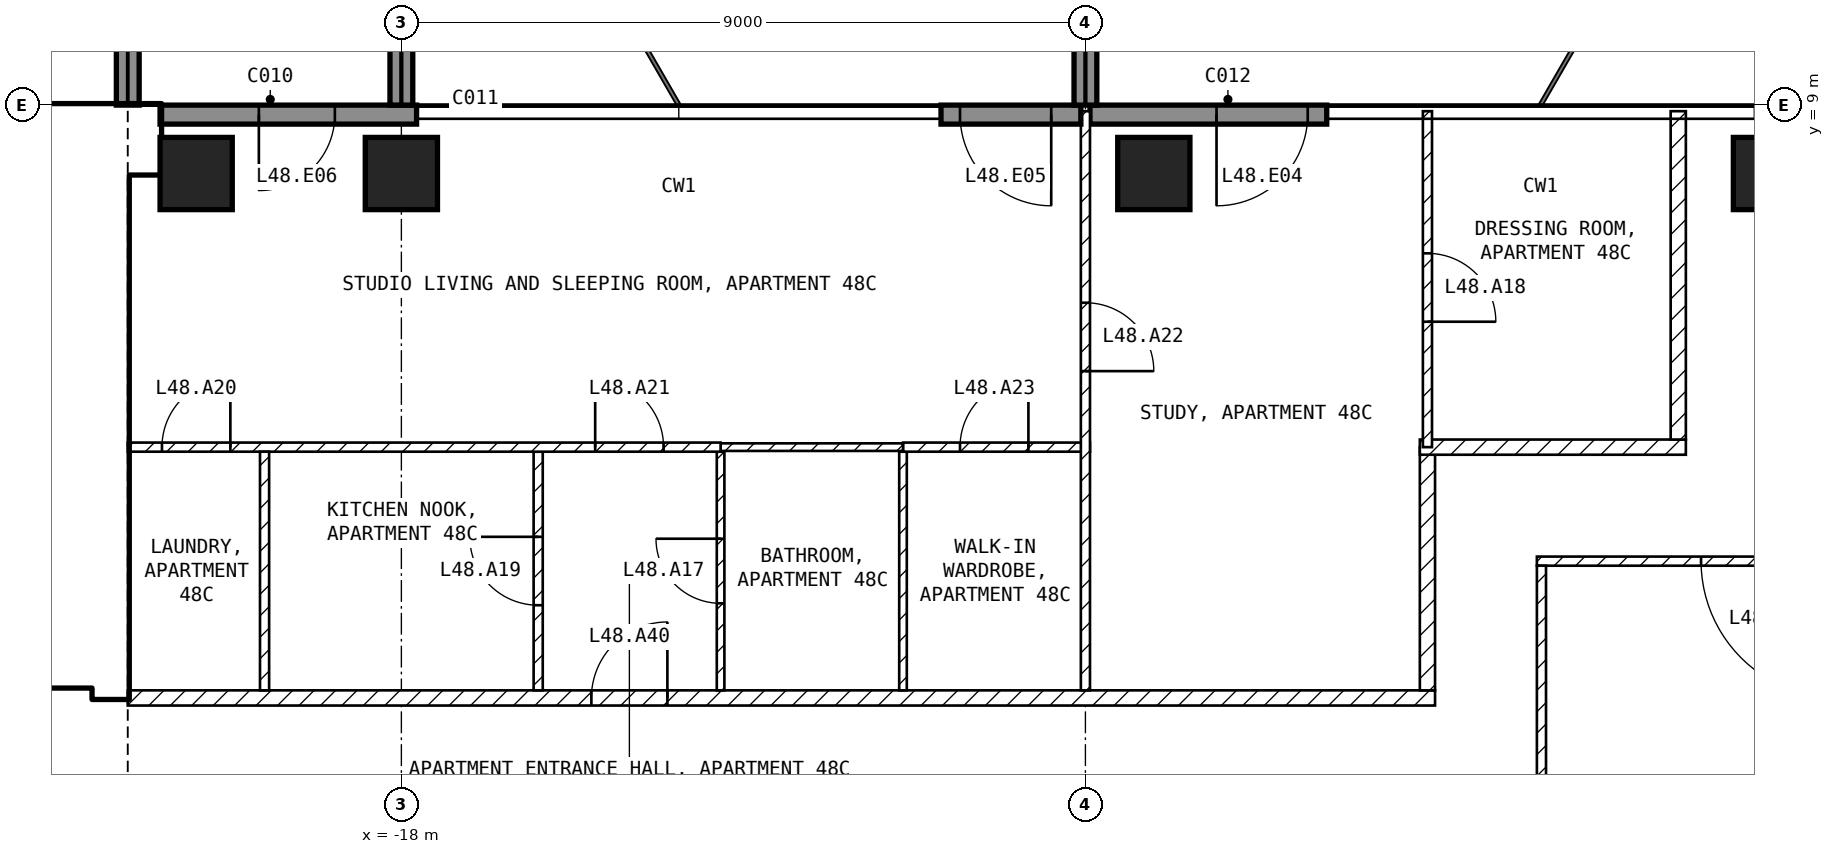
"""IFC4 building model, lengths in metres.
Left out: names, types, materials, properties, quantities, classifications, styles, units other than length and angle.
Written with IfcOpenShell. Run it as: python <this file> out.ifc"""

import sys

from ifc_helpers import new_model, si_unit, direction, frame, frame_2d, origin, origin_2d, place, context, subcontext, project, spatial, rectangle, extrude, element, fill, save


model = new_model("IFC4")
c1 = context("Model", 3, precision=1e-05, world=origin(), true_north=direction((0.0, 1.0)))
c2 = subcontext(c1, "Body", "Model", "MODEL_VIEW")
j1 = project(units=[si_unit("LENGTHUNIT", "METRE"), si_unit("PLANEANGLEUNIT", "RADIAN")], contexts=[c1])
p1 = place(None, origin())
s1 = spatial("IfcSite", under=j1, at=p1, CompositionType="ELEMENT")
p2 = place(p1, origin())
s2 = spatial("IfcBuilding", under=s1, at=p2, CompositionType="ELEMENT")
p3 = place(p2, frame((0.0, 0.0, 194.6)))
s3 = spatial("IfcBuildingStorey", under=s2, at=p3, CompositionType="ELEMENT", Elevation=194.6)
for number, where, z_axis, x_axis in (
    (1, (-20.7, 8.1, -0.25), (0.0, 0.0, 1.0), (1.0, 0.0, 0.0)),
    (2, (-18.0, 8.1, -0.25), (0.0, 0.0, 1.0), (1.0, 0.0, 0.0)),
    (3, (-8.1, 8.1, -0.25), (0.0, 0.0, 1.0), (1.0, 0.0, 0.0)),
    (4, (0.0, 8.1, -0.25), (0.0, 0.0, 1.0), (1.0, 0.0, 0.0)),
):
    element("IfcColumn", number, at=place(p3, frame(where, z_axis=z_axis, x_axis=x_axis)), inside=s3, PredefinedType="COLUMN", context=c2, shape_type="SweptSolid", body=[
        extrude(rectangle(XDim=0.95, YDim=0.95, at=origin_2d()), origin(), (0.0, 0.0, 1.0), 3.5),
    ])
p4 = place(p3, frame((-5.825, 8.875, 0.0), z_axis=(0.0, 0.0, 1.0), x_axis=(-1.0, 0.0, 0.0)))
e5 = element("IfcWall", 5, at=p4, inside=s3, PredefinedType="SOLIDWALL", context=c2, shape_type="SweptSolid", body=[
    extrude(rectangle(XDim=3.115, YDim=0.25, at=frame_2d((1.558, 0.0))), origin(), (0.0, 0.0, 1.0), 3.25),
])
p5 = place(p4, frame((0.25, 0.0, 0.0)))
e6 = element("IfcOpeningElement", 6, at=p5, cuts=e5, PredefinedType="OPENING", context=c2, shape_type="SweptSolid", body=[
    extrude(rectangle(XDim=1.2, YDim=2.4, at=frame_2d((0.6, 1.2))), frame((0.0, 0.135, 0.0), z_axis=(0.0, -1.0, 0.0), x_axis=(1.0, 0.0, 0.0)), (0.0, 0.0, 1.0), 0.27),
])
p6 = place(p3, frame((-9.06, 8.875, 0.0), z_axis=(0.0, 0.0, 1.0), x_axis=(-1.0, 0.0, 0.0)))
e7 = element("IfcWall", 7, at=p6, inside=s3, PredefinedType="SOLIDWALL", context=c2, shape_type="SweptSolid", body=[
    extrude(rectangle(XDim=1.84, YDim=0.25, at=frame_2d((0.92, 0.0))), origin(), (0.0, 0.0, 1.0), 3.25),
])
p7 = place(p6, frame((0.39, 0.0, 0.0)))
e8 = element("IfcOpeningElement", 8, at=p7, cuts=e7, PredefinedType="OPENING", context=c2, shape_type="SweptSolid", body=[
    extrude(rectangle(XDim=1.2, YDim=2.4, at=frame_2d((0.6, 1.2))), frame((0.0, 0.135, 0.0), z_axis=(0.0, -1.0, 0.0), x_axis=(1.0, 0.0, 0.0)), (0.0, 0.0, 1.0), 0.27),
])
p8 = place(p3, frame((-17.8, 8.875, 0.0), z_axis=(0.0, 0.0, 1.0), x_axis=(-1.0, 0.0, 0.0)))
e9 = element("IfcWall", 9, at=p8, inside=s3, PredefinedType="SOLIDWALL", context=c2, shape_type="SweptSolid", body=[
    extrude(rectangle(XDim=3.375, YDim=0.25, at=frame_2d((1.688, 0.0))), origin(), (0.0, 0.0, 1.0), 3.25),
])
p9 = place(p8, frame((1.075, 0.0, 0.0)))
e10 = element("IfcOpeningElement", 10, at=p9, cuts=e9, PredefinedType="OPENING", context=c2, shape_type="SweptSolid", body=[
    extrude(rectangle(XDim=1.0, YDim=2.4, at=frame_2d((0.5, 1.2))), frame((0.0, 0.135, 0.0), z_axis=(0.0, -1.0, 0.0), x_axis=(1.0, 0.0, 0.0)), (0.0, 0.0, 1.0), 0.27),
])
for number, where, z_axis, x_axis in (
    (11, (-21.6, 9.0, 0.0), (0.0, 0.0, 1.0), (0.0, 1.0, 0.0)),
    (12, (-18.0, 9.0, 0.0), (0.0, 0.0, 1.0), (0.0, 1.0, 0.0)),
    (13, (-9.0, 9.0, 0.0), (0.0, 0.0, 1.0), (0.0, 1.0, 0.0)),
):
    element("IfcWall", number, at=place(p3, frame(where, z_axis=z_axis, x_axis=x_axis)), inside=s3, PredefinedType="SOLIDWALL", context=c2, shape_type="SweptSolid", body=[
        extrude(rectangle(XDim=2.7, YDim=0.3, at=frame_2d((1.35, 0.0))), origin(), (0.0, 0.0, 1.0), 3.25),
    ])
p10 = place(p3, frame((-29.6, 8.55, 0.0), z_axis=(0.0, 0.0, 1.0), x_axis=(1.0, 0.0, 0.0)))
e14 = element("IfcWall", 14, at=p10, inside=s3, PredefinedType="SHEAR", context=c2, shape_type="SweptSolid", body=[
    extrude(rectangle(XDim=8.425, YDim=0.9, at=frame_2d((4.212, 0.0))), origin(), (0.0, 0.0, 1.0), 3.25),
])
p11 = place(p3, frame((-21.825, 1.2, 0.0), z_axis=(0.0, 0.0, 1.0), x_axis=(0.0, 1.0, 0.0)))
e15 = element("IfcWall", 15, at=p11, inside=s3, PredefinedType="SHEAR", context=c2, shape_type="SweptSolid", body=[
    extrude(rectangle(XDim=6.9, YDim=0.45, at=frame_2d((3.45, 0.0))), origin(), (0.0, 0.0, 1.0), 3.25),
])
p12 = place(p3, frame((-33.2, 1.45, 0.0), z_axis=(0.0, 0.0, 1.0), x_axis=(1.0, 0.0, 0.0)))
e16 = element("IfcWall", 16, at=p12, inside=s3, PredefinedType="SOLIDWALL", context=c2, shape_type="SweptSolid", body=[
    extrude(rectangle(XDim=11.15, YDim=0.2, at=frame_2d((5.575, 0.0))), origin(), (0.0, 0.0, 1.0), 3.25),
])
p13 = place(p12, frame((9.4, 0.0, 0.0)))
e17 = element("IfcOpeningElement", 17, at=p13, cuts=e16, PredefinedType="OPENING", context=c2, shape_type="SweptSolid", body=[
    extrude(rectangle(XDim=1.0, YDim=2.1, at=frame_2d((0.5, 1.05))), frame((0.0, 0.11, 0.0), z_axis=(0.0, -1.0, 0.0), x_axis=(1.0, 0.0, 0.0)), (0.0, 0.0, 1.0), 0.22),
])
p14 = place(p12, frame((6.9, 0.0, 0.0)))
e18 = element("IfcOpeningElement", 18, at=p14, cuts=e16, PredefinedType="OPENING", context=c2, shape_type="SweptSolid", body=[
    extrude(rectangle(XDim=1.0, YDim=2.1, at=frame_2d((0.5, 1.05))), frame((0.0, 0.11, 0.0), z_axis=(0.0, -1.0, 0.0), x_axis=(1.0, 0.0, 0.0)), (0.0, 0.0, 1.0), 0.22),
])
p15 = place(p12, frame((1.1, 0.0, 0.0)))
e19 = element("IfcOpeningElement", 19, at=p15, cuts=e16, PredefinedType="OPENING", context=c2, shape_type="SweptSolid", body=[
    extrude(rectangle(XDim=0.9, YDim=2.1, at=frame_2d((0.45, 1.05))), frame((0.0, 0.11, 0.0), z_axis=(0.0, -1.0, 0.0), x_axis=(1.0, 0.0, 0.0)), (0.0, 0.0, 1.0), 0.22),
])
p16 = place(p3, frame((-28.35, 5.15, 0.0), z_axis=(0.0, 0.0, 1.0), x_axis=(1.0, 0.0, 0.0)))
e20 = element("IfcWall", 20, at=p16, inside=s3, PredefinedType="SOLIDWALL", context=c2, shape_type="SweptSolid", body=[
    extrude(rectangle(XDim=6.3, YDim=0.2, at=frame_2d((3.15, 0.0))), origin(), (0.0, 0.0, 1.0), 3.25),
])
p17 = place(p16, frame((5.1, 0.0, 0.0)))
e21 = element("IfcOpeningElement", 21, at=p17, cuts=e20, PredefinedType="OPENING", context=c2, shape_type="SweptSolid", body=[
    extrude(rectangle(XDim=1.0, YDim=2.1, at=frame_2d((0.5, 1.05))), frame((0.0, 0.11, 0.0), z_axis=(0.0, -1.0, 0.0), x_axis=(1.0, 0.0, 0.0)), (0.0, 0.0, 1.0), 0.22),
])
p18 = place(p3, frame((3.06, 3.0, 0.0), z_axis=(0.0, 0.0, 1.0), x_axis=(-1.0, 0.0, 0.0)))
e22 = element("IfcWall", 22, at=p18, inside=s3, PredefinedType="PARTITIONING", context=c2, shape_type="SweptSolid", body=[
    extrude(rectangle(XDim=6.12, YDim=0.12, at=frame_2d((3.06, 0.0))), origin(), (0.0, 0.0, 1.0), 3.25),
])
p19 = place(p18, frame((2.16, 0.0, 0.0)))
e23 = element("IfcOpeningElement", 23, at=p19, cuts=e22, PredefinedType="OPENING", context=c2, shape_type="SweptSolid", body=[
    extrude(rectangle(XDim=1.8, YDim=2.1, at=frame_2d((0.9, 1.05))), frame((0.0, 0.07, 0.0), z_axis=(0.0, -1.0, 0.0), x_axis=(1.0, 0.0, 0.0)), (0.0, 0.0, 1.0), 0.14),
])
p20 = place(p3, frame((-3.0, 2.94, 0.0), z_axis=(0.0, 0.0, 1.0), x_axis=(0.0, -1.0, 0.0)))
e24 = element("IfcWall", 24, at=p20, inside=s3, PredefinedType="PARTITIONING", context=c2, shape_type="SweptSolid", body=[
    extrude(rectangle(XDim=5.88, YDim=0.12, at=frame_2d((2.94, 0.0))), origin(), (0.0, 0.0, 1.0), 3.25),
])
p21 = place(p3, frame((-21.6, 1.2, 0.0), z_axis=(0.0, 0.0, 1.0), x_axis=(1.0, 0.0, 0.0)))
e25 = element("IfcWall", 25, at=p21, inside=s3, PredefinedType="PARTITIONING", context=c2, shape_type="SweptSolid", body=[
    extrude(rectangle(XDim=17.2, YDim=0.2, at=frame_2d((8.6, 0.0))), origin(), (0.0, 0.0, 1.0), 3.25),
])
p22 = place(p21, frame((6.1, 0.0, 0.0)))
e26 = element("IfcOpeningElement", 26, at=p22, cuts=e25, PredefinedType="OPENING", context=c2, shape_type="SweptSolid", body=[
    extrude(rectangle(XDim=1.0, YDim=2.1, at=frame_2d((0.5, 1.05))), frame((0.0, 0.11, 0.0), z_axis=(0.0, -1.0, 0.0), x_axis=(1.0, 0.0, 0.0)), (0.0, 0.0, 1.0), 0.22),
])
p23 = place(p3, frame((-4.5, 1.3, 0.0), z_axis=(0.0, 0.0, 1.0), x_axis=(0.0, 1.0, 0.0)))
e27 = element("IfcWall", 27, at=p23, inside=s3, PredefinedType="PARTITIONING", context=c2, shape_type="SweptSolid", body=[
    extrude(rectangle(XDim=3.2, YDim=0.2, at=frame_2d((1.6, 0.0))), origin(), (0.0, 0.0, 1.0), 3.25),
])
p24 = place(p3, frame((-4.6, 4.5, 0.0), z_axis=(0.0, 0.0, 1.0), x_axis=(1.0, 0.0, 0.0)))
e28 = element("IfcWall", 28, at=p24, inside=s3, PredefinedType="PARTITIONING", context=c2, shape_type="SweptSolid", body=[
    extrude(rectangle(XDim=3.5, YDim=0.2, at=frame_2d((1.75, 0.0))), origin(), (0.0, 0.0, 1.0), 3.25),
])
p25 = place(p3, frame((-1.2, 4.6, 0.0), z_axis=(0.0, 0.0, 1.0), x_axis=(0.0, 1.0, 0.0)))
e29 = element("IfcWall", 29, at=p25, inside=s3, PredefinedType="PARTITIONING", context=c2, shape_type="SweptSolid", body=[
    extrude(rectangle(XDim=4.32, YDim=0.2, at=frame_2d((2.16, 0.0))), origin(), (0.0, 0.0, 1.0), 3.25),
])
p26 = place(p3, frame((-11.4, 1.3, 0.0), z_axis=(0.0, 0.0, 1.0), x_axis=(0.0, 1.0, 0.0)))
e30 = element("IfcWall", 30, at=p26, inside=s3, PredefinedType="PARTITIONING", context=c2, shape_type="SweptSolid", body=[
    extrude(rectangle(XDim=3.14, YDim=0.1, at=frame_2d((1.57, 0.0))), origin(), (0.0, 0.0, 1.0), 3.25),
])
p27 = place(p3, frame((-11.4, 4.5, 0.0), z_axis=(0.0, 0.0, 1.0), x_axis=(1.0, 0.0, 0.0)))
e31 = element("IfcWall", 31, at=p27, inside=s3, PredefinedType="PARTITIONING", context=c2, shape_type="SweptSolid", body=[
    extrude(rectangle(XDim=2.46, YDim=0.12, at=frame_2d((1.23, 0.0))), origin(), (0.0, 0.0, 1.0), 3.25),
])
p28 = place(p27, frame((0.75, 0.0, 0.0)))
e32 = element("IfcOpeningElement", 32, at=p28, cuts=e31, PredefinedType="OPENING", context=c2, shape_type="SweptSolid", body=[
    extrude(rectangle(XDim=0.9, YDim=2.1, at=frame_2d((0.45, 1.05))), frame((0.0, 0.07, 0.0), z_axis=(0.0, -1.0, 0.0), x_axis=(1.0, 0.0, 0.0)), (0.0, 0.0, 1.0), 0.14),
])
p29 = place(p3, frame((-9.0, 8.92, 0.0), z_axis=(0.0, 0.0, 1.0), x_axis=(0.0, -1.0, 0.0)))
e33 = element("IfcWall", 33, at=p29, inside=s3, PredefinedType="PARTITIONING", context=c2, shape_type="SweptSolid", body=[
    extrude(rectangle(XDim=7.62, YDim=0.12, at=frame_2d((3.81, 0.0))), origin(), (0.0, 0.0, 1.0), 3.25),
])
p30 = place(p29, frame((2.52, 0.0, 0.0)))
e34 = element("IfcOpeningElement", 34, at=p30, cuts=e33, PredefinedType="OPENING", context=c2, shape_type="SweptSolid", body=[
    extrude(rectangle(XDim=0.9, YDim=2.1, at=frame_2d((0.45, 1.05))), frame((0.0, 0.07, 0.0), z_axis=(0.0, -1.0, 0.0), x_axis=(1.0, 0.0, 0.0)), (0.0, 0.0, 1.0), 0.14),
])
p31 = place(p3, frame((-13.8, 1.3, 0.0), z_axis=(0.0, 0.0, 1.0), x_axis=(0.0, 1.0, 0.0)))
e35 = element("IfcWall", 35, at=p31, inside=s3, PredefinedType="PARTITIONING", context=c2, shape_type="SweptSolid", body=[
    extrude(rectangle(XDim=3.14, YDim=0.1, at=frame_2d((1.57, 0.0))), origin(), (0.0, 0.0, 1.0), 3.25),
])
p32 = place(p31, frame((1.145, 0.0, 0.0)))
e36 = element("IfcOpeningElement", 36, at=p32, cuts=e35, PredefinedType="OPENING", context=c2, shape_type="SweptSolid", body=[
    extrude(rectangle(XDim=0.85, YDim=2.1, at=frame_2d((0.425, 1.05))), frame((0.0, 0.06, 0.0), z_axis=(0.0, -1.0, 0.0), x_axis=(1.0, 0.0, 0.0)), (0.0, 0.0, 1.0), 0.12),
])
p33 = place(p3, frame((-13.8, 4.5, 0.0), z_axis=(0.0, 0.0, 1.0), x_axis=(1.0, 0.0, 0.0)))
e37 = element("IfcWall", 37, at=p33, inside=s3, PredefinedType="PARTITIONING", context=c2, shape_type="SweptSolid", body=[
    extrude(rectangle(XDim=2.4, YDim=0.1, at=frame_2d((1.2, 0.0))), origin(), (0.0, 0.0, 1.0), 3.25),
])
p34 = place(p3, frame((-16.2, 1.3, 0.0), z_axis=(0.0, 0.0, 1.0), x_axis=(0.0, 1.0, 0.0)))
e38 = element("IfcWall", 38, at=p34, inside=s3, PredefinedType="PARTITIONING", context=c2, shape_type="SweptSolid", body=[
    extrude(rectangle(XDim=3.14, YDim=0.12, at=frame_2d((1.57, 0.0))), origin(), (0.0, 0.0, 1.0), 3.25),
])
p35 = place(p34, frame((1.12, 0.0, 0.0)))
e39 = element("IfcOpeningElement", 39, at=p35, cuts=e38, PredefinedType="OPENING", context=c2, shape_type="SweptSolid", body=[
    extrude(rectangle(XDim=0.9, YDim=2.1, at=frame_2d((0.45, 1.05))), frame((0.0, 0.07, 0.0), z_axis=(0.0, -1.0, 0.0), x_axis=(1.0, 0.0, 0.0)), (0.0, 0.0, 1.0), 0.14),
])
p36 = place(p3, frame((-21.6, 4.5, 0.0), z_axis=(0.0, 0.0, 1.0), x_axis=(1.0, 0.0, 0.0)))
e40 = element("IfcWall", 40, at=p36, inside=s3, PredefinedType="PARTITIONING", context=c2, shape_type="SweptSolid", body=[
    extrude(rectangle(XDim=7.8, YDim=0.12, at=frame_2d((3.9, 0.0))), origin(), (0.0, 0.0, 1.0), 3.25),
])
p37 = place(p36, frame((0.45, 0.0, 0.0)))
e41 = element("IfcOpeningElement", 41, at=p37, cuts=e40, PredefinedType="OPENING", context=c2, shape_type="SweptSolid", body=[
    extrude(rectangle(XDim=0.9, YDim=2.1, at=frame_2d((0.45, 1.05))), frame((0.0, 0.07, 0.0), z_axis=(0.0, -1.0, 0.0), x_axis=(1.0, 0.0, 0.0)), (0.0, 0.0, 1.0), 0.14),
])
p38 = place(p36, frame((6.15, 0.0, 0.0)))
e42 = element("IfcOpeningElement", 42, at=p38, cuts=e40, PredefinedType="OPENING", context=c2, shape_type="SweptSolid", body=[
    extrude(rectangle(XDim=0.9, YDim=2.1, at=frame_2d((0.45, 1.05))), frame((0.0, 0.07, 0.0), z_axis=(0.0, -1.0, 0.0), x_axis=(1.0, 0.0, 0.0)), (0.0, 0.0, 1.0), 0.14),
])
p39 = place(p3, frame((-19.8, 1.3, 0.0), z_axis=(0.0, 0.0, 1.0), x_axis=(0.0, 1.0, 0.0)))
e43 = element("IfcWall", 43, at=p39, inside=s3, PredefinedType="PARTITIONING", context=c2, shape_type="SweptSolid", body=[
    extrude(rectangle(XDim=3.14, YDim=0.12, at=frame_2d((1.57, 0.0))), origin(), (0.0, 0.0, 1.0), 3.25),
])
p40 = place(p3, frame((-4.5, 8.92, 0.0), z_axis=(0.0, 0.0, 1.0), x_axis=(0.0, -1.0, 0.0)))
e44 = element("IfcWall", 44, at=p40, inside=s3, PredefinedType="PARTITIONING", context=c2, shape_type="SweptSolid", body=[
    extrude(rectangle(XDim=4.42, YDim=0.12, at=frame_2d((2.21, 0.0))), origin(), (0.0, 0.0, 1.0), 3.25),
])
p41 = place(p40, frame((1.87, 0.0, 0.0)))
e45 = element("IfcOpeningElement", 45, at=p41, cuts=e44, PredefinedType="OPENING", context=c2, shape_type="SweptSolid", body=[
    extrude(rectangle(XDim=0.9, YDim=2.1, at=frame_2d((0.45, 1.05))), frame((0.0, 0.07, 0.0), z_axis=(0.0, -1.0, 0.0), x_axis=(1.0, 0.0, 0.0)), (0.0, 0.0, 1.0), 0.14),
])
p42 = place(p5, origin())
e46 = element("IfcDoor", 46, at=p42, inside=s3, OperationType="SINGLE_SWING_RIGHT", PredefinedType="DOOR", context=c2, shape_type="SweptSolid", body=[
    extrude(rectangle(XDim=1.2, YDim=2.4, at=frame_2d((0.6, 1.2))), frame((0.0, 0.025, 0.0), z_axis=(0.0, -1.0, 0.0), x_axis=(1.0, 0.0, 0.0)), (0.0, 0.0, 1.0), 0.05),
])
fill(e6, e46)
p43 = place(p7, origin())
e47 = element("IfcDoor", 47, at=p43, inside=s3, OperationType="SINGLE_SWING_LEFT", PredefinedType="DOOR", context=c2, shape_type="SweptSolid", body=[
    extrude(rectangle(XDim=1.2, YDim=2.4, at=frame_2d((0.6, 1.2))), frame((0.0, 0.025, 0.0), z_axis=(0.0, -1.0, 0.0), x_axis=(1.0, 0.0, 0.0)), (0.0, 0.0, 1.0), 0.05),
])
fill(e8, e47)
p44 = place(p9, origin())
e48 = element("IfcDoor", 48, at=p44, inside=s3, OperationType="SINGLE_SWING_RIGHT", PredefinedType="DOOR", context=c2, shape_type="SweptSolid", body=[
    extrude(rectangle(XDim=1.0, YDim=2.4, at=frame_2d((0.5, 1.2))), frame((0.0, 0.025, 0.0), z_axis=(0.0, -1.0, 0.0), x_axis=(1.0, 0.0, 0.0)), (0.0, 0.0, 1.0), 0.05),
])
fill(e10, e48)
p45 = place(p17, origin())
e49 = element("IfcDoor", 49, at=p45, inside=s3, OperationType="SINGLE_SWING_LEFT", PredefinedType="DOOR", context=c2, shape_type="SweptSolid", body=[
    extrude(rectangle(XDim=1.0, YDim=2.1, at=frame_2d((0.5, 1.05))), frame((0.0, 0.025, 0.0), z_axis=(0.0, -1.0, 0.0), x_axis=(1.0, 0.0, 0.0)), (0.0, 0.0, 1.0), 0.05),
])
fill(e21, e49)
p46 = place(p19, origin())
e50 = element("IfcDoor", 50, at=p46, inside=s3, OperationType="SINGLE_SWING_LEFT", PredefinedType="DOOR", context=c2, shape_type="SweptSolid", body=[
    extrude(rectangle(XDim=1.8, YDim=2.1, at=frame_2d((0.9, 1.05))), frame((0.0, 0.025, 0.0), z_axis=(0.0, -1.0, 0.0), x_axis=(1.0, 0.0, 0.0)), (0.0, 0.0, 1.0), 0.05),
])
fill(e23, e50)
p47 = place(p32, origin())
e51 = element("IfcDoor", 51, at=p47, inside=s3, OperationType="SINGLE_SWING_RIGHT", PredefinedType="DOOR", context=c2, shape_type="SweptSolid", body=[
    extrude(rectangle(XDim=0.85, YDim=2.1, at=frame_2d((0.425, 1.05))), frame((0.0, 0.025, 0.0), z_axis=(0.0, -1.0, 0.0), x_axis=(1.0, 0.0, 0.0)), (0.0, 0.0, 1.0), 0.05),
])
fill(e36, e51)
p48 = place(p41, origin())
e52 = element("IfcDoor", 52, at=p48, inside=s3, OperationType="SINGLE_SWING_RIGHT", PredefinedType="DOOR", context=c2, shape_type="SweptSolid", body=[
    extrude(rectangle(XDim=0.9, YDim=2.1, at=frame_2d((0.45, 1.05))), frame((0.0, 0.025, 0.0), z_axis=(0.0, -1.0, 0.0), x_axis=(1.0, 0.0, 0.0)), (0.0, 0.0, 1.0), 0.05),
])
fill(e45, e52)
p49 = place(p35, origin())
e53 = element("IfcDoor", 53, at=p49, inside=s3, OperationType="SINGLE_SWING_RIGHT", PredefinedType="DOOR", context=c2, shape_type="SweptSolid", body=[
    extrude(rectangle(XDim=0.9, YDim=2.1, at=frame_2d((0.45, 1.05))), frame((0.0, 0.025, 0.0), z_axis=(0.0, -1.0, 0.0), x_axis=(1.0, 0.0, 0.0)), (0.0, 0.0, 1.0), 0.05),
])
fill(e39, e53)
p50 = place(p37, origin())
e54 = element("IfcDoor", 54, at=p50, inside=s3, OperationType="SINGLE_SWING_RIGHT", PredefinedType="DOOR", context=c2, shape_type="SweptSolid", body=[
    extrude(rectangle(XDim=0.9, YDim=2.1, at=frame_2d((0.45, 1.05))), frame((0.0, 0.025, 0.0), z_axis=(0.0, -1.0, 0.0), x_axis=(1.0, 0.0, 0.0)), (0.0, 0.0, 1.0), 0.05),
])
fill(e41, e54)
p51 = place(p38, origin())
e55 = element("IfcDoor", 55, at=p51, inside=s3, OperationType="SINGLE_SWING_LEFT", PredefinedType="DOOR", context=c2, shape_type="SweptSolid", body=[
    extrude(rectangle(XDim=0.9, YDim=2.1, at=frame_2d((0.45, 1.05))), frame((0.0, 0.025, 0.0), z_axis=(0.0, -1.0, 0.0), x_axis=(1.0, 0.0, 0.0)), (0.0, 0.0, 1.0), 0.05),
])
fill(e42, e55)
p52 = place(p30, origin())
e56 = element("IfcDoor", 56, at=p52, inside=s3, OperationType="SINGLE_SWING_RIGHT", PredefinedType="DOOR", context=c2, shape_type="SweptSolid", body=[
    extrude(rectangle(XDim=0.9, YDim=2.1, at=frame_2d((0.45, 1.05))), frame((0.0, 0.025, 0.0), z_axis=(0.0, -1.0, 0.0), x_axis=(1.0, 0.0, 0.0)), (0.0, 0.0, 1.0), 0.05),
])
fill(e34, e56)
p53 = place(p28, origin())
e57 = element("IfcDoor", 57, at=p53, inside=s3, OperationType="SINGLE_SWING_RIGHT", PredefinedType="DOOR", context=c2, shape_type="SweptSolid", body=[
    extrude(rectangle(XDim=0.9, YDim=2.1, at=frame_2d((0.45, 1.05))), frame((0.0, 0.025, 0.0), z_axis=(0.0, -1.0, 0.0), x_axis=(1.0, 0.0, 0.0)), (0.0, 0.0, 1.0), 0.05),
])
fill(e32, e57)
p54 = place(p22, origin())
e58 = element("IfcDoor", 58, at=p54, inside=s3, OperationType="SINGLE_SWING_RIGHT", PredefinedType="DOOR", context=c2, shape_type="SweptSolid", body=[
    extrude(rectangle(XDim=1.0, YDim=2.1, at=frame_2d((0.5, 1.05))), frame((0.0, 0.025, 0.0), z_axis=(0.0, -1.0, 0.0), x_axis=(1.0, 0.0, 0.0)), (0.0, 0.0, 1.0), 0.05),
])
fill(e26, e58)
save(model, sys.argv[1])
